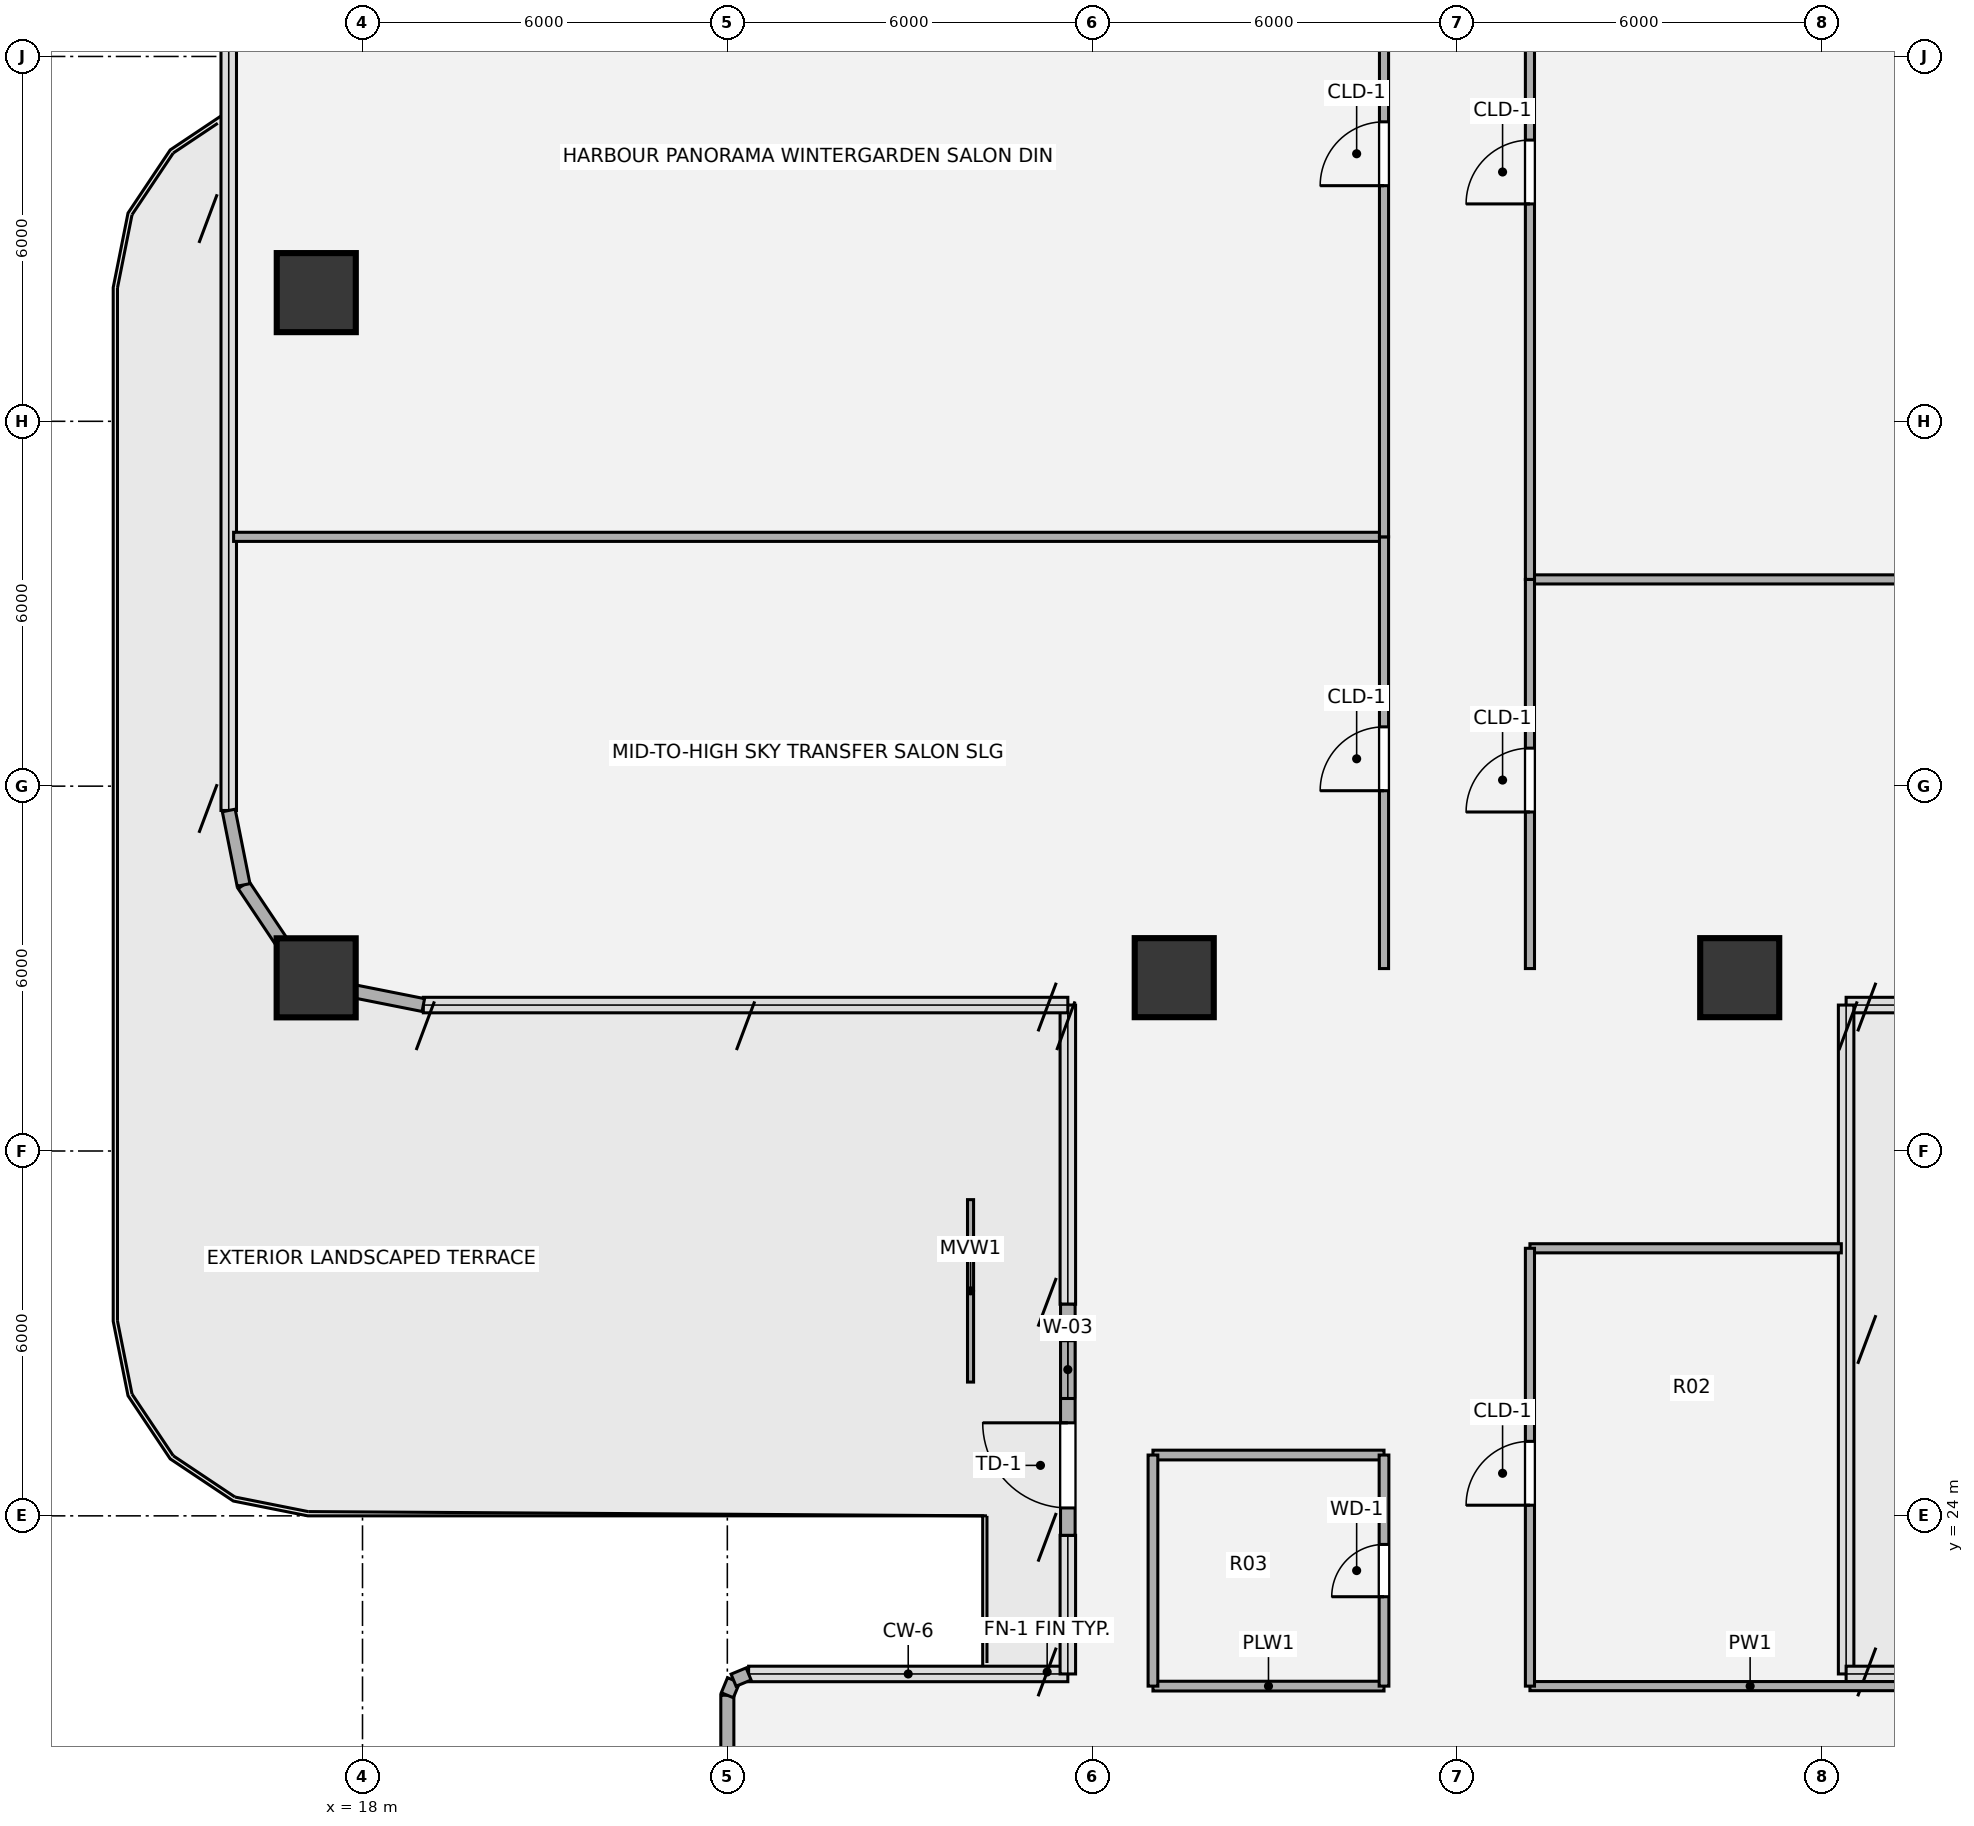
"""IFC4 building model, lengths in metres.
Left out: names, types, materials, properties, quantities, classifications, styles, units other than length and angle.
Written with IfcOpenShell. Run it as: python <this file> out.ifc"""

import sys

from ifc_helpers import new_model, si_unit, direction, frame, frame_2d, origin, origin_2d, place, context, subcontext, project, spatial, rectangle, hollow_circle, extrude, source, transform, mapped, element, fill, save


model = new_model("IFC4")
c1 = context("Model", 3, precision=1e-05, world=origin(), true_north=direction((0.0, 1.0)))
c2 = subcontext(c1, "Body", "Model", "MODEL_VIEW")
j1 = project(units=[si_unit("LENGTHUNIT", "METRE"), si_unit("PLANEANGLEUNIT", "RADIAN")], contexts=[c1])
p1 = place(None, origin())
s1 = spatial("IfcSite", under=j1, at=p1, CompositionType="ELEMENT")
p2 = place(p1, origin())
s2 = spatial("IfcBuilding", under=s1, at=p2, CompositionType="ELEMENT")
p3 = place(p2, frame((0.0, 0.0, 151.92)))
s3 = spatial("IfcBuildingStorey", under=s2, at=p3, CompositionType="ELEMENT", Elevation=151.92)
m1 = source(origin(), c2, "Body", "SweptSolid", [
    extrude(hollow_circle(Radius=0.65, WallThickness=0.045, at=origin_2d()), origin(), (0.0, 0.0, 1.0), 4.717),
])
p4 = place(p3, frame((16.886, 31.405, 0.0), z_axis=(0.149069248521, 0.611960321271, 0.77671289698), x_axis=(-0.97158950951, 0.236672400185, 0.0)))
e1 = element("IfcColumn", 1, at=p4, inside=s3, PredefinedType="COLUMN", context=c2, shape_type="MappedRepresentation", body=[
    mapped(m1, transform((0.0, 0.0, 0.0), x_axis=(1.0, 0.0, 0.0), y_axis=(0.0, 1.0, 0.0), z_axis=(0.0, 0.0, 1.0), scale=1.0)),
])
m2 = source(origin(), c2, "Body", "SweptSolid", [
    extrude(hollow_circle(Radius=0.65, WallThickness=0.045, at=origin_2d()), origin(), (0.0, 0.0, 1.0), 4.608),
])
p5 = place(p3, frame((16.886, 42.777, 0.0), z_axis=(0.153340545343, 0.581199876249, 0.79918294589), x_axis=(-0.966913345059, 0.255105043359, 0.0)))
e2 = element("IfcColumn", 2, at=p5, inside=s3, PredefinedType="COLUMN", context=c2, shape_type="MappedRepresentation", body=[
    mapped(m2, transform((0.0, 0.0, 0.0), x_axis=(1.0, 0.0, 0.0), y_axis=(0.0, 1.0, 0.0), z_axis=(0.0, 0.0, 1.0), scale=1.0)),
])
m3 = source(origin(), c2, "Body", "SweptSolid", [
    extrude(hollow_circle(Radius=0.65, WallThickness=0.045, at=origin_2d()), origin(), (0.0, 0.0, 1.0), 4.673),
])
for number, where, z_axis, x_axis in (
    (3, (31.35, 31.405, 0.0), (0.0, 0.619, 0.786), (-1.0, 0.0, 0.0)),
    (4, (40.65, 31.405, 0.0), (0.0, 0.619, 0.786), (-1.0, 0.0, 0.0)),
):
    element("IfcColumn", number, at=place(p3, frame(where, z_axis=z_axis, x_axis=x_axis)), inside=s3, PredefinedType="COLUMN", context=c2, shape_type="MappedRepresentation", body=[
        mapped(m3, transform((0.0, 0.0, 0.0), x_axis=(1.0, 0.0, 0.0), y_axis=(0.0, 1.0, 0.0), z_axis=(0.0, 0.0, 1.0), scale=1.0)),
    ])
p6 = place(p3, frame((24.0, 18.355, 0.0), z_axis=(0.0, 0.0, 1.0), x_axis=(0.0, 1.0, 0.0)))
e5 = element("IfcWall", 5, at=p6, inside=s3, PredefinedType="SOLIDWALL", context=c2, shape_type="SweptSolid", body=[
    extrude(rectangle(XDim=2.695, YDim=0.215, at=frame_2d((1.348, 0.0))), origin(), (0.0, 0.0, 1.0), 2.28),
])
p7 = place(p3, frame((24.0, 21.05, 0.0), z_axis=(0.0, 0.0, 1.0), x_axis=(0.382673670509, 0.923883575944, 0.0)))
e6 = element("IfcWall", 6, at=p7, inside=s3, PredefinedType="SOLIDWALL", context=c2, shape_type="SweptSolid", body=[
    extrude(rectangle(XDim=0.268, YDim=0.215, at=frame_2d((0.134, 0.0))), origin(), (0.0, 0.0, 1.0), 4.092),
])
p8 = place(p3, frame((24.103, 21.298, 0.0), z_axis=(0.0, 0.0, 1.0), x_axis=(0.924205486139, 0.381895560841, 0.0)))
e7 = element("IfcWall", 7, at=p8, inside=s3, PredefinedType="SOLIDWALL", context=c2, shape_type="SweptSolid", body=[
    extrude(rectangle(XDim=0.268, YDim=0.215, at=frame_2d((0.134, 0.0))), origin(), (0.0, 0.0, 1.0), 4.092),
])
p9 = place(p3, frame((29.6, 23.68, 0.0), z_axis=(0.0, 0.0, 1.0), x_axis=(0.0, 1.0, 0.0)))
e8 = element("IfcWall", 8, at=p9, inside=s3, PredefinedType="SOLIDWALL", context=c2, shape_type="SweptSolid", body=[
    extrude(rectangle(XDim=3.8, YDim=0.24, at=frame_2d((1.9, 0.0))), origin(), (0.0, 0.0, 1.0), 4.092),
])
p10 = place(p9, frame((0.45, 0.0, 0.0)))
e9 = element("IfcOpeningElement", 9, at=p10, cuts=e8, PredefinedType="OPENING", context=c2, shape_type="SweptSolid", body=[
    extrude(rectangle(XDim=1.4, YDim=2.15, at=origin_2d()), frame((0.7, 0.13, 1.075), z_axis=(0.0, -1.0, 0.0), x_axis=(1.0, 0.0, 0.0)), (0.0, 0.0, 1.0), 0.26),
])
p11 = place(p9, frame((2.25, 0.0, 0.85)))
e10 = element("IfcOpeningElement", 10, at=p11, cuts=e8, PredefinedType="OPENING", context=c2, shape_type="SweptSolid", body=[
    extrude(rectangle(XDim=0.95, YDim=1.35, at=origin_2d()), frame((0.475, 0.13, 0.675), z_axis=(0.0, -1.0, 0.0), x_axis=(1.0, 0.0, 0.0)), (0.0, 0.0, 1.0), 0.26),
])
for number, where, z_axis, x_axis in (
    (11, (19.0, 32.4, 0.0), (0.0, 0.0, 1.0), (-0.981, 0.195, 0.0)),
    (12, (17.775, 32.644, 0.0), (0.0, 0.0, 1.0), (-0.831, 0.556, 0.0)),
    (13, (16.737, 33.337, 0.0), (0.0, 0.0, 1.0), (-0.556, 0.831, 0.0)),
    (14, (16.044, 34.375, 0.0), (0.0, 0.0, 1.0), (-0.195, 0.981, 0.0)),
):
    element("IfcWall", number, at=place(p3, frame(where, z_axis=z_axis, x_axis=x_axis)), inside=s3, PredefinedType="SOLIDWALL", context=c2, shape_type="SweptSolid", body=[
        extrude(rectangle(XDim=1.249, YDim=0.215, at=frame_2d((0.624, 0.0))), origin(), (0.0, 0.0, 1.0), 4.092),
    ])
p12 = place(p3, frame((31.0, 21.2, 0.0), z_axis=(0.0, 0.0, 1.0), x_axis=(1.0, 0.0, 0.0)))
e15 = element("IfcWall", 15, at=p12, inside=s3, PredefinedType="PLUMBINGWALL", context=c2, shape_type="SweptSolid", body=[
    extrude(rectangle(XDim=3.8, YDim=0.16, at=frame_2d((1.9, 0.0))), origin(), (0.0, 0.0, 1.0), 4.062),
])
p13 = place(p3, frame((37.2, 21.2, 0.0), z_axis=(0.0, 0.0, 1.0), x_axis=(1.0, 0.0, 0.0)))
e16 = element("IfcWall", 16, at=p13, inside=s3, PredefinedType="PARTITIONING", context=c2, shape_type="SweptSolid", body=[
    extrude(rectangle(XDim=7.243, YDim=0.15, at=frame_2d((3.621, 0.0))), origin(), (0.0, 0.0, 1.0), 4.062),
])
p14 = place(p3, frame((31.0, 25.0, 0.0), z_axis=(0.0, 0.0, 1.0), x_axis=(1.0, 0.0, 0.0)))
e17 = element("IfcWall", 17, at=p14, inside=s3, PredefinedType="PLUMBINGWALL", context=c2, shape_type="SweptSolid", body=[
    extrude(rectangle(XDim=3.8, YDim=0.16, at=frame_2d((1.9, 0.0))), origin(), (0.0, 0.0, 1.0), 4.062),
])
p15 = place(p3, frame((37.2, 28.4, 0.0), z_axis=(0.0, 0.0, 1.0), x_axis=(1.0, 0.0, 0.0)))
e18 = element("IfcWall", 18, at=p15, inside=s3, PredefinedType="PARTITIONING", context=c2, shape_type="SweptSolid", body=[
    extrude(rectangle(XDim=5.121, YDim=0.15, at=frame_2d((2.561, 0.0))), origin(), (0.0, 0.0, 1.0), 4.062),
])
for number, where, z_axis, x_axis in (
    (19, (37.2, 39.4, 0.0), (0.0, 0.0, 1.0), (1.0, 0.0, 0.0)),
    (20, (15.88, 40.1, 0.0), (0.0, 0.0, 1.0), (1.0, 0.0, 0.0)),
):
    element("IfcWall", number, at=place(p3, frame(where, z_axis=z_axis, x_axis=x_axis)), inside=s3, PredefinedType="PARTITIONING", context=c2, shape_type="SweptSolid", body=[
        extrude(rectangle(XDim=18.92, YDim=0.15, at=frame_2d((9.46, 0.0))), origin(), (0.0, 0.0, 1.0), 3.544),
    ])
p16 = place(p3, frame((31.0, 21.2, 0.0), z_axis=(0.0, 0.0, 1.0), x_axis=(0.0, 1.0, 0.0)))
e21 = element("IfcWall", 21, at=p16, inside=s3, PredefinedType="PLUMBINGWALL", context=c2, shape_type="SweptSolid", body=[
    extrude(rectangle(XDim=3.8, YDim=0.16, at=frame_2d((1.9, 0.0))), origin(), (0.0, 0.0, 1.0), 4.062),
])
p17 = place(p3, frame((34.8, 21.2, 0.0), z_axis=(0.0, 0.0, 1.0), x_axis=(0.0, 1.0, 0.0)))
e22 = element("IfcWall", 22, at=p17, inside=s3, PredefinedType="PLUMBINGWALL", context=c2, shape_type="SweptSolid", body=[
    extrude(rectangle(XDim=3.8, YDim=0.16, at=frame_2d((1.9, 0.0))), origin(), (0.0, 0.0, 1.0), 4.062),
])
p18 = place(p17, frame((1.47, 0.0, 0.0)))
e23 = element("IfcOpeningElement", 23, at=p18, cuts=e22, PredefinedType="OPENING", context=c2, shape_type="SweptSolid", body=[
    extrude(rectangle(XDim=0.86, YDim=2.1, at=origin_2d()), frame((0.43, 0.09, 1.05), z_axis=(0.0, -1.0, 0.0), x_axis=(1.0, 0.0, 0.0)), (0.0, 0.0, 1.0), 0.18),
])
p19 = place(p3, frame((34.8, 33.0, 0.0), z_axis=(0.0, 0.0, 1.0), x_axis=(0.0, 1.0, 0.0)))
e24 = element("IfcWall", 24, at=p19, inside=s3, PredefinedType="PARTITIONING", context=c2, shape_type="SweptSolid", body=[
    extrude(rectangle(XDim=7.1, YDim=0.15, at=frame_2d((3.55, 0.0))), origin(), (0.0, 0.0, 1.0), 4.062),
])
p20 = place(p19, frame((2.925, 0.0, 0.0)))
e25 = element("IfcOpeningElement", 25, at=p20, cuts=e24, PredefinedType="OPENING", context=c2, shape_type="SweptSolid", body=[
    extrude(rectangle(XDim=1.05, YDim=2.1, at=origin_2d()), frame((0.525, 0.085, 1.05), z_axis=(0.0, -1.0, 0.0), x_axis=(1.0, 0.0, 0.0)), (0.0, 0.0, 1.0), 0.17),
])
p21 = place(p3, frame((34.8, 40.1, 0.0), z_axis=(0.0, 0.0, 1.0), x_axis=(0.0, 1.0, 0.0)))
e26 = element("IfcWall", 26, at=p21, inside=s3, PredefinedType="PARTITIONING", context=c2, shape_type="SweptSolid", body=[
    extrude(rectangle(XDim=12.5, YDim=0.15, at=frame_2d((6.25, 0.0))), origin(), (0.0, 0.0, 1.0), 4.062),
])
p22 = place(p21, frame((5.775, 0.0, 0.0)))
e27 = element("IfcOpeningElement", 27, at=p22, cuts=e26, PredefinedType="OPENING", context=c2, shape_type="SweptSolid", body=[
    extrude(rectangle(XDim=1.05, YDim=2.1, at=origin_2d()), frame((0.525, 0.085, 1.05), z_axis=(0.0, -1.0, 0.0), x_axis=(1.0, 0.0, 0.0)), (0.0, 0.0, 1.0), 0.17),
])
p23 = place(p3, frame((37.2, 21.2, 0.0), z_axis=(0.0, 0.0, 1.0), x_axis=(0.0, 1.0, 0.0)))
e28 = element("IfcWall", 28, at=p23, inside=s3, PredefinedType="PARTITIONING", context=c2, shape_type="SweptSolid", body=[
    extrude(rectangle(XDim=7.2, YDim=0.15, at=frame_2d((3.6, 0.0))), origin(), (0.0, 0.0, 1.0), 4.062),
])
p24 = place(p23, frame((2.975, 0.0, 0.0)))
e29 = element("IfcOpeningElement", 29, at=p24, cuts=e28, PredefinedType="OPENING", context=c2, shape_type="SweptSolid", body=[
    extrude(rectangle(XDim=1.05, YDim=2.1, at=origin_2d()), frame((0.525, 0.085, 1.05), z_axis=(0.0, -1.0, 0.0), x_axis=(1.0, 0.0, 0.0)), (0.0, 0.0, 1.0), 0.17),
])
p25 = place(p3, frame((37.2, 33.0, 0.0), z_axis=(0.0, 0.0, 1.0), x_axis=(0.0, 1.0, 0.0)))
e30 = element("IfcWall", 30, at=p25, inside=s3, PredefinedType="PARTITIONING", context=c2, shape_type="SweptSolid", body=[
    extrude(rectangle(XDim=6.4, YDim=0.15, at=frame_2d((3.2, 0.0))), origin(), (0.0, 0.0, 1.0), 4.062),
])
p26 = place(p25, frame((2.575, 0.0, 0.0)))
e31 = element("IfcOpeningElement", 31, at=p26, cuts=e30, PredefinedType="OPENING", context=c2, shape_type="SweptSolid", body=[
    extrude(rectangle(XDim=1.05, YDim=2.1, at=origin_2d()), frame((0.525, 0.085, 1.05), z_axis=(0.0, -1.0, 0.0), x_axis=(1.0, 0.0, 0.0)), (0.0, 0.0, 1.0), 0.17),
])
p27 = place(p3, frame((37.2, 39.4, 0.0), z_axis=(0.0, 0.0, 1.0), x_axis=(0.0, 1.0, 0.0)))
e32 = element("IfcWall", 32, at=p27, inside=s3, PredefinedType="PARTITIONING", context=c2, shape_type="SweptSolid", body=[
    extrude(rectangle(XDim=13.2, YDim=0.15, at=frame_2d((6.6, 0.0))), origin(), (0.0, 0.0, 1.0), 4.062),
])
p28 = place(p27, frame((6.175, 0.0, 0.0)))
e33 = element("IfcOpeningElement", 33, at=p28, cuts=e32, PredefinedType="OPENING", context=c2, shape_type="SweptSolid", body=[
    extrude(rectangle(XDim=1.05, YDim=2.1, at=origin_2d()), frame((0.525, 0.085, 1.05), z_axis=(0.0, -1.0, 0.0), x_axis=(1.0, 0.0, 0.0)), (0.0, 0.0, 1.0), 0.17),
])
p29 = place(p3, frame((28.0, 26.2, 0.0), z_axis=(0.0, 0.0, 1.0), x_axis=(0.0, 1.0, 0.0)))
e34 = element("IfcWall", 34, at=p29, inside=s3, PredefinedType="MOVABLE", context=c2, shape_type="SweptSolid", body=[
    extrude(rectangle(XDim=3.0, YDim=0.1, at=frame_2d((1.5, 0.0))), origin(), (0.0, 0.0, 1.0), 2.85),
])
m4 = source(origin(), c2, "Body", "SweptSolid", [
    extrude(rectangle(XDim=1.4, YDim=2.15, at=origin_2d()), frame((0.7, 0.025, 1.075), z_axis=(0.0, -1.0, 0.0), x_axis=(1.0, 0.0, 0.0)), (0.0, 0.0, 1.0), 0.05),
])
p30 = place(p10, origin())
e35 = element("IfcDoor", 35, at=p30, inside=s3, OperationType="SINGLE_SWING_RIGHT", PredefinedType="DOOR", context=c2, shape_type="MappedRepresentation", body=[
    mapped(m4, transform((0.0, 0.0, 0.0), x_axis=(1.0, 0.0, 0.0), y_axis=(0.0, 1.0, 0.0), z_axis=(0.0, 0.0, 1.0), scale=1.0)),
])
fill(e9, e35)
m5 = source(origin(), c2, "Body", "SweptSolid", [
    extrude(rectangle(XDim=0.95, YDim=1.35, at=origin_2d()), frame((0.475, 0.03, 0.675), z_axis=(0.0, -1.0, 0.0), x_axis=(1.0, 0.0, 0.0)), (0.0, 0.0, 1.0), 0.06),
])
p31 = place(p11, origin())
e36 = element("IfcWindow", 36, at=p31, inside=s3, PartitioningType="SINGLE_PANEL", PredefinedType="WINDOW", context=c2, shape_type="MappedRepresentation", body=[
    mapped(m5, transform((0.0, 0.0, 0.0), x_axis=(1.0, 0.0, 0.0), y_axis=(0.0, 1.0, 0.0), z_axis=(0.0, 0.0, 1.0), scale=1.0)),
])
fill(e10, e36)
m6 = source(origin(), c2, "Body", "SweptSolid", [
    extrude(rectangle(XDim=0.86, YDim=2.1, at=origin_2d()), frame((0.43, 0.025, 1.05), z_axis=(0.0, -1.0, 0.0), x_axis=(1.0, 0.0, 0.0)), (0.0, 0.0, 1.0), 0.05),
])
p32 = place(p18, origin())
e37 = element("IfcDoor", 37, at=p32, inside=s3, OperationType="SINGLE_SWING_LEFT", PredefinedType="DOOR", context=c2, shape_type="MappedRepresentation", body=[
    mapped(m6, transform((0.0, 0.0, 0.0), x_axis=(1.0, 0.0, 0.0), y_axis=(0.0, 1.0, 0.0), z_axis=(0.0, 0.0, 1.0), scale=1.0)),
])
fill(e23, e37)
m7 = source(origin(), c2, "Body", "SweptSolid", [
    extrude(rectangle(XDim=1.05, YDim=2.1, at=origin_2d()), frame((0.525, 0.025, 1.05), z_axis=(0.0, -1.0, 0.0), x_axis=(1.0, 0.0, 0.0)), (0.0, 0.0, 1.0), 0.05),
])
p33 = place(p20, origin())
e38 = element("IfcDoor", 38, at=p33, inside=s3, OperationType="SINGLE_SWING_LEFT", PredefinedType="DOOR", context=c2, shape_type="MappedRepresentation", body=[
    mapped(m7, transform((0.0, 0.0, 0.0), x_axis=(1.0, 0.0, 0.0), y_axis=(0.0, 1.0, 0.0), z_axis=(0.0, 0.0, 1.0), scale=1.0)),
])
fill(e25, e38)
p34 = place(p22, origin())
e39 = element("IfcDoor", 39, at=p34, inside=s3, OperationType="SINGLE_SWING_LEFT", PredefinedType="DOOR", context=c2, shape_type="MappedRepresentation", body=[
    mapped(m7, transform((0.0, 0.0, 0.0), x_axis=(1.0, 0.0, 0.0), y_axis=(0.0, 1.0, 0.0), z_axis=(0.0, 0.0, 1.0), scale=1.0)),
])
fill(e27, e39)
p35 = place(p24, origin())
e40 = element("IfcDoor", 40, at=p35, inside=s3, OperationType="SINGLE_SWING_LEFT", PredefinedType="DOOR", context=c2, shape_type="MappedRepresentation", body=[
    mapped(m7, transform((0.0, 0.0, 0.0), x_axis=(1.0, 0.0, 0.0), y_axis=(0.0, 1.0, 0.0), z_axis=(0.0, 0.0, 1.0), scale=1.0)),
])
fill(e29, e40)
p36 = place(p26, origin())
e41 = element("IfcDoor", 41, at=p36, inside=s3, OperationType="SINGLE_SWING_LEFT", PredefinedType="DOOR", context=c2, shape_type="MappedRepresentation", body=[
    mapped(m7, transform((0.0, 0.0, 0.0), x_axis=(1.0, 0.0, 0.0), y_axis=(0.0, 1.0, 0.0), z_axis=(0.0, 0.0, 1.0), scale=1.0)),
])
fill(e31, e41)
p37 = place(p28, origin())
e42 = element("IfcDoor", 42, at=p37, inside=s3, OperationType="SINGLE_SWING_LEFT", PredefinedType="DOOR", context=c2, shape_type="MappedRepresentation", body=[
    mapped(m7, transform((0.0, 0.0, 0.0), x_axis=(1.0, 0.0, 0.0), y_axis=(0.0, 1.0, 0.0), z_axis=(0.0, 0.0, 1.0), scale=1.0)),
])
fill(e33, e42)
save(model, sys.argv[1])
